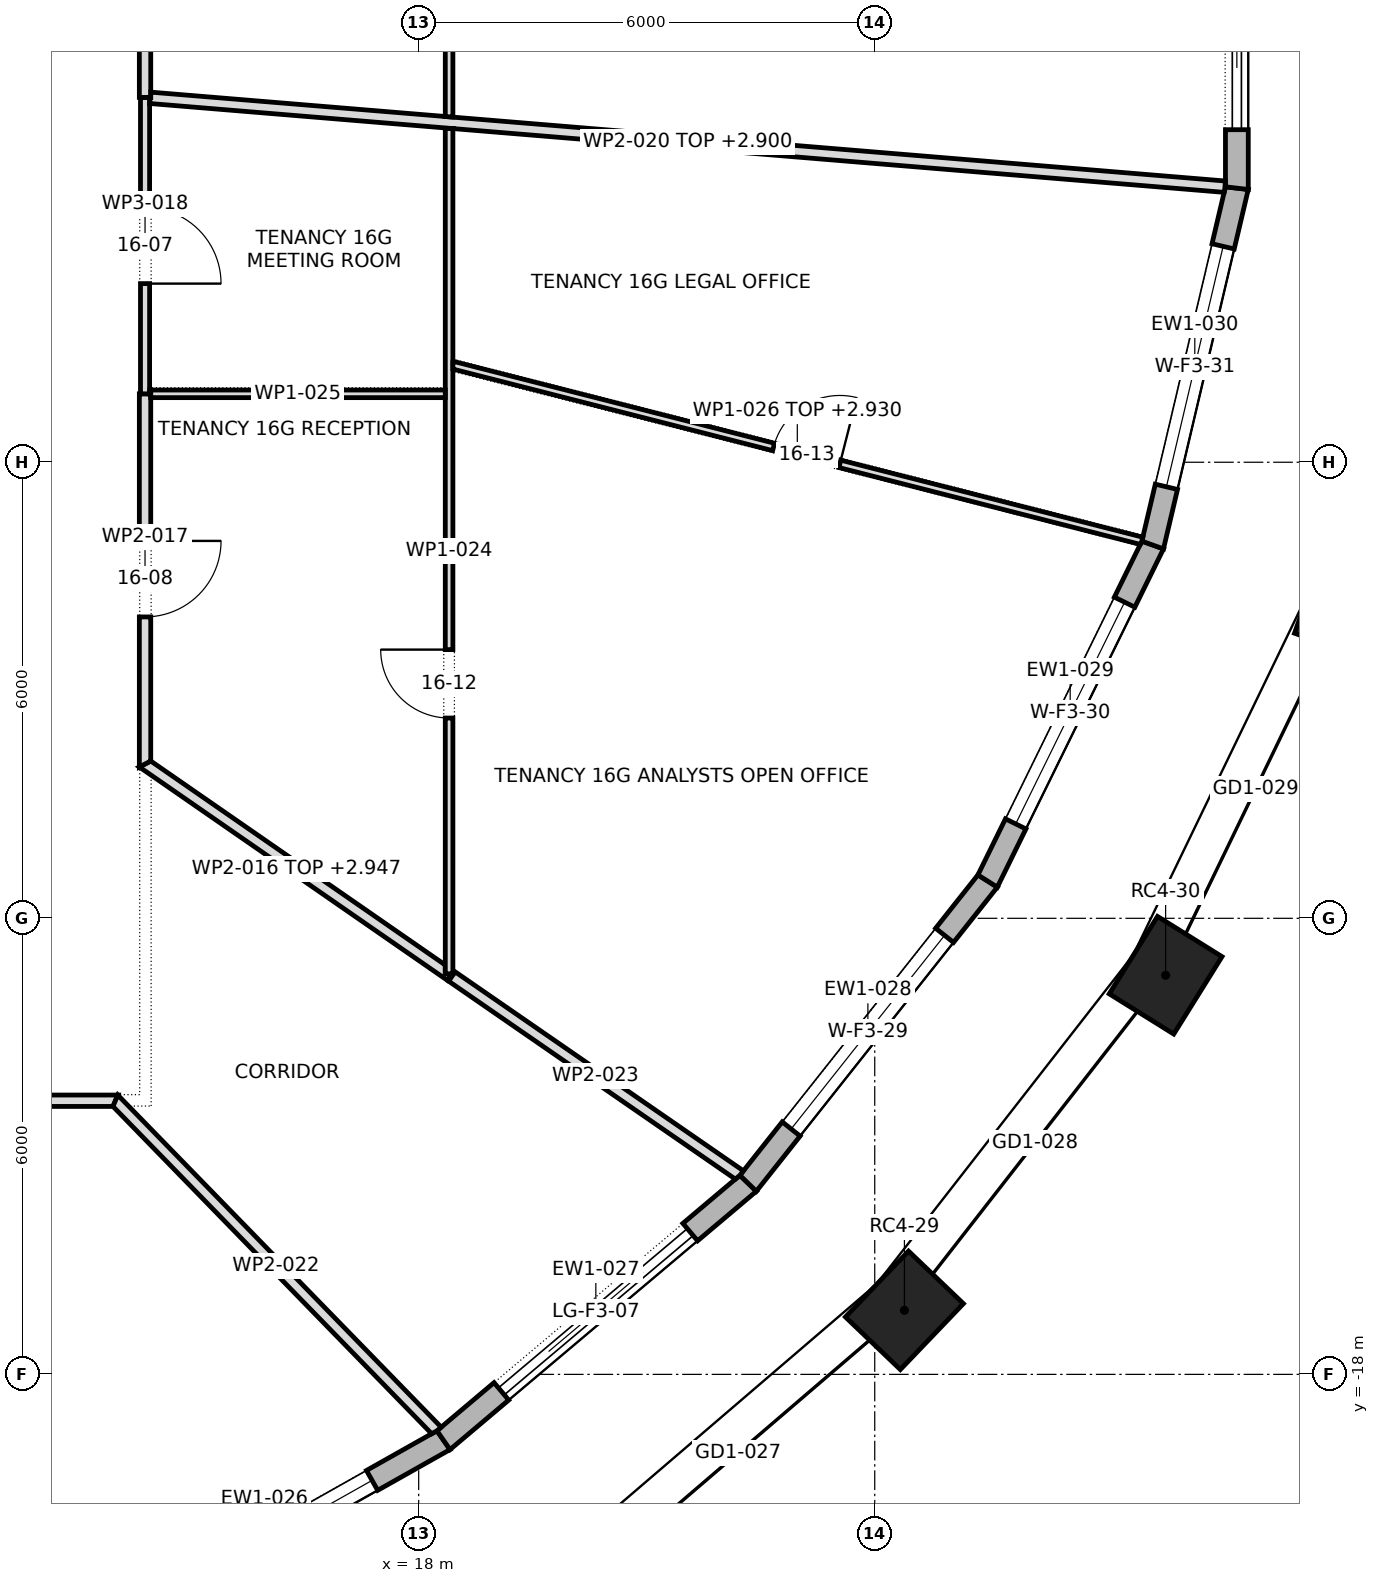
"""IFC4 building model, lengths in metres.
Left out: names, types, materials, properties, quantities, classifications, styles, units other than length and angle.
Written with IfcOpenShell. Run it as: python <this file> out.ifc"""

import sys

from ifc_helpers import new_model, si_unit, direction, frame, frame_2d, origin, origin_2d, place, context, subcontext, project, spatial, polyline, rectangle, outline, extrude, element, fill, save


model = new_model("IFC4")
c1 = context("Model", 3, precision=1e-05, world=origin(), true_north=direction((0.0, 1.0)))
c2 = subcontext(c1, "Body", "Model", "MODEL_VIEW")
j1 = project(units=[si_unit("LENGTHUNIT", "METRE"), si_unit("PLANEANGLEUNIT", "RADIAN")], contexts=[c1])
p1 = place(None, origin())
s1 = spatial("IfcSite", under=j1, at=p1, CompositionType="ELEMENT")
p2 = place(p1, origin())
s2 = spatial("IfcBuilding", under=s1, at=p2, CompositionType="ELEMENT")
p3 = place(p2, frame((0.0, 0.0, 226.9)))
s3 = spatial("IfcBuildingStorey", under=s2, at=p3, CompositionType="ELEMENT", Elevation=226.9)
for number, where, z_axis, x_axis in (
    (1, (24.39, -17.157, 0.0), (0.0, 0.0, 1.0), (0.692, 0.722, 0.0)),
    (2, (27.827, -12.749, 0.0), (0.0, 0.0, 1.0), (0.529, 0.849, 0.0)),
    (3, (30.194, -7.851, 0.0), (0.0, 0.0, 1.0), (0.334, 0.943, 0.0)),
):
    element("IfcColumn", number, at=place(p3, frame(where, z_axis=z_axis, x_axis=x_axis)), inside=s3, PredefinedType="COLUMN", context=c2, shape_type="SweptSolid", body=[
        extrude(rectangle(XDim=1.2, YDim=1.0, at=origin_2d()), origin(), (0.0, 0.0, 1.0), 4.0),
    ])
p4 = place(p3, frame((13.616, -21.52, 0.0), z_axis=(0.0, 0.0, 1.0), x_axis=(0.871225596594, 0.490882837181, 0.0)))
e4 = element("IfcWall", 4, at=p4, inside=s3, PredefinedType="STANDARD", context=c2, shape_type="SweptSolid", body=[
    extrude(outline(polyline([(-0.013, -0.15), (5.421, -0.15), (5.393, 0.15), (0.013, 0.15), (-0.013, -0.15)])), origin(), (0.0, 0.0, 1.0), 3.7),
])
p5 = place(p4, frame((1.078, 0.0, 0.6)))
e5 = element("IfcOpeningElement", 5, at=p5, cuts=e4, PredefinedType="OPENING", context=c2, shape_type="SweptSolid", body=[
    extrude(rectangle(XDim=3.25, YDim=2.65, at=frame_2d((1.625, 1.325))), frame((0.0, 0.162, 0.0), z_axis=(0.0, -1.0, 0.0), x_axis=(1.0, 0.0, 0.0)), (0.0, 0.0, 1.0), 0.324),
])
p6 = place(p3, frame((18.326, -18.865, 0.0), z_axis=(0.0, 0.0, 1.0), x_axis=(0.764475071601, 0.644653290459, 0.0)))
e6 = element("IfcWall", 6, at=p6, inside=s3, PredefinedType="STANDARD", context=c2, shape_type="SweptSolid", body=[
    extrude(outline(polyline([(-0.014, -0.15), (5.258, -0.15), (5.228, 0.15), (0.014, 0.15), (-0.014, -0.15)])), origin(), (0.0, 0.0, 1.0), 3.7),
])
p7 = place(p6, frame((0.996, 0.0, 0.0)))
e7 = element("IfcOpeningElement", 7, at=p7, cuts=e6, PredefinedType="OPENING", context=c2, shape_type="SweptSolid", body=[
    extrude(rectangle(XDim=3.25, YDim=3.25, at=frame_2d((1.625, 1.625))), frame((0.0, 0.162, 0.0), z_axis=(0.0, -1.0, 0.0), x_axis=(1.0, 0.0, 0.0)), (0.0, 0.0, 1.0), 0.324),
])
p8 = place(p3, frame((22.334, -15.486, 0.0), z_axis=(0.0, 0.0, 1.0), x_axis=(0.621084984443, 0.783743224596, 0.0)))
e8 = element("IfcWall", 8, at=p8, inside=s3, PredefinedType="STANDARD", context=c2, shape_type="SweptSolid", body=[
    extrude(outline(polyline([(-0.015, -0.15), (5.089, -0.15), (5.057, 0.15), (0.015, 0.15), (-0.015, -0.15)])), origin(), (0.0, 0.0, 1.0), 3.7),
])
p9 = place(p8, frame((0.912, 0.0, 0.6)))
e9 = element("IfcOpeningElement", 9, at=p9, cuts=e8, PredefinedType="OPENING", context=c2, shape_type="SweptSolid", body=[
    extrude(rectangle(XDim=3.25, YDim=2.65, at=frame_2d((1.625, 1.325))), frame((0.0, 0.162, 0.0), z_axis=(0.0, -1.0, 0.0), x_axis=(1.0, 0.0, 0.0)), (0.0, 0.0, 1.0), 0.324),
])
p10 = place(p3, frame((25.485, -11.51, 0.0), z_axis=(0.0, 0.0, 1.0), x_axis=(0.440857641837, 0.897577038272, 0.0)))
e10 = element("IfcWall", 10, at=p10, inside=s3, PredefinedType="STANDARD", context=c2, shape_type="SweptSolid", body=[
    extrude(outline(polyline([(-0.016, -0.15), (4.942, -0.15), (4.908, 0.15), (0.016, 0.15), (-0.016, -0.15)])), origin(), (0.0, 0.0, 1.0), 3.7),
])
p11 = place(p10, frame((0.838, 0.0, 0.6)))
e11 = element("IfcOpeningElement", 11, at=p11, cuts=e10, PredefinedType="OPENING", context=c2, shape_type="SweptSolid", body=[
    extrude(rectangle(XDim=3.25, YDim=2.65, at=frame_2d((1.625, 1.325))), frame((0.0, 0.162, 0.0), z_axis=(0.0, -1.0, 0.0), x_axis=(1.0, 0.0, 0.0)), (0.0, 0.0, 1.0), 0.324),
])
p12 = place(p3, frame((27.656, -7.089, 0.0), z_axis=(0.0, 0.0, 1.0), x_axis=(0.229617574796, 0.97328093033, 0.0)))
e12 = element("IfcWall", 12, at=p12, inside=s3, PredefinedType="STANDARD", context=c2, shape_type="SweptSolid", body=[
    extrude(outline(polyline([(-0.017, -0.15), (4.841, -0.15), (4.807, 0.15), (0.017, 0.15), (-0.017, -0.15)])), origin(), (0.0, 0.0, 1.0), 3.7),
])
p13 = place(p12, frame((0.787, 0.0, 0.6)))
e13 = element("IfcOpeningElement", 13, at=p13, cuts=e12, PredefinedType="OPENING", context=c2, shape_type="SweptSolid", body=[
    extrude(rectangle(XDim=3.25, YDim=2.65, at=frame_2d((1.625, 1.325))), frame((0.0, 0.162, 0.0), z_axis=(0.0, -1.0, 0.0), x_axis=(1.0, 0.0, 0.0)), (0.0, 0.0, 1.0), 0.324),
])
p14 = place(p3, frame((28.764, -2.394, 0.0), z_axis=(0.0, 0.0, 1.0), x_axis=(0.0, 1.0, 0.0)))
e14 = element("IfcWall", 14, at=p14, inside=s3, PredefinedType="STANDARD", context=c2, shape_type="SweptSolid", body=[
    extrude(outline(polyline([(-0.017, -0.15), (4.805, -0.15), (4.77, 0.15), (0.017, 0.15), (-0.017, -0.15)])), origin(), (0.0, 0.0, 1.0), 3.7),
])
p15 = place(p14, frame((0.769, 0.0, 0.0)))
e15 = element("IfcOpeningElement", 15, at=p15, cuts=e14, PredefinedType="OPENING", context=c2, shape_type="SweptSolid", body=[
    extrude(rectangle(XDim=3.25, YDim=3.25, at=frame_2d((1.625, 1.625))), frame((0.0, 0.162, 0.0), z_axis=(0.0, -1.0, 0.0), x_axis=(1.0, 0.0, 0.0)), (0.0, 0.0, 1.0), 0.324),
])
p16 = place(p3, frame((14.042, -14.4, 0.0), z_axis=(0.0, 0.0, 1.0), x_axis=(-1.0, 0.0, 0.0)))
e16 = element("IfcWall", 16, at=p16, inside=s3, PredefinedType="PARTITIONING", context=c2, shape_type="SweptSolid", body=[
    extrude(outline(polyline([(12.446, -0.075), (12.446, -0.075), (12.278, 0.075), (10.533, 0.075), (8.788, 0.075), (7.043, 0.075), (5.298, 0.075), (3.553, 0.075), (1.808, 0.075), (0.063, 0.075), (0.0, -0.075), (1.778, -0.075), (3.556, -0.075), (5.334, -0.075), (7.112, -0.075), (8.89, -0.075), (10.668, -0.075), (12.446, -0.075)])), origin(), (0.0, 0.0, 1.0), 3.7),
])
p17 = place(p16, frame((5.697, 0.0, 0.0)))
e17 = element("IfcOpeningElement", 17, at=p17, cuts=e16, PredefinedType="OPENING", context=c2, shape_type="SweptSolid", body=[
    extrude(rectangle(XDim=1.0, YDim=2.1, at=frame_2d((0.5, 1.05))), frame((0.0, 0.087, 0.0), z_axis=(0.0, -1.0, 0.0), x_axis=(1.0, 0.0, 0.0)), (0.0, 0.0, 1.0), 0.174),
])
p18 = place(p3, frame((14.368, -9.948, 0.0), z_axis=(0.0, 0.0, 1.0), x_axis=(0.822094305235, -0.569351344339, 0.0)))
e18 = element("IfcWall", 18, at=p18, inside=s3, PredefinedType="PARTITIONING", context=c2, shape_type="SweptSolid", body=[
    extrude(outline(polyline([(4.939, -0.075), (4.939, 0.036), (4.858, -0.02), (4.792, 0.075), (3.221, 0.075), (1.65, 0.075), (0.079, 0.075), (0.039, 0.0), (0.0, -0.075), (1.646, -0.075), (3.293, -0.075), (4.939, -0.075)])), origin(), (0.0, 0.0, 1.0), 2.947),
])
p19 = place(p3, frame((14.4, -5.1, 0.0), z_axis=(0.0, 0.0, 1.0), x_axis=(0.0, -1.0, 0.0)))
e19 = element("IfcWall", 19, at=p19, inside=s3, PredefinedType="PARTITIONING", context=c2, shape_type="SweptSolid", body=[
    extrude(outline(polyline([(4.909, -0.075), (4.909, -0.075), (4.831, 0.075), (3.22, 0.075), (1.61, 0.075), (0.0, 0.075), (0.0, -0.075), (1.636, -0.075), (3.273, -0.075), (4.909, -0.075)])), origin(), (0.0, 0.0, 1.0), 3.7),
])
p20 = place(p19, frame((1.935, 0.0, 0.0)))
e20 = element("IfcOpeningElement", 20, at=p20, cuts=e19, PredefinedType="OPENING", context=c2, shape_type="SweptSolid", body=[
    extrude(rectangle(XDim=1.0, YDim=2.1, at=frame_2d((0.5, 1.05))), frame((0.0, 0.087, 0.0), z_axis=(0.0, -1.0, 0.0), x_axis=(1.0, 0.0, 0.0)), (0.0, 0.0, 1.0), 0.174),
])
p21 = place(p3, frame((14.4, -1.2, 0.0), z_axis=(0.0, 0.0, 1.0), x_axis=(0.0, -1.0, 0.0)))
e21 = element("IfcWall", 21, at=p21, inside=s3, PredefinedType="PARTITIONING", context=c2, shape_type="SweptSolid", body=[
    extrude(rectangle(XDim=3.9, YDim=0.12, at=frame_2d((1.95, 0.0))), origin(), (0.0, 0.0, 1.0), 3.7),
])
p22 = place(p21, frame((1.45, 0.0, 0.0)))
e22 = element("IfcOpeningElement", 22, at=p22, cuts=e21, PredefinedType="OPENING", context=c2, shape_type="SweptSolid", body=[
    extrude(rectangle(XDim=1.0, YDim=2.1, at=frame_2d((0.5, 1.05))), frame((0.0, 0.072, 0.0), z_axis=(0.0, -1.0, 0.0), x_axis=(1.0, 0.0, 0.0)), (0.0, 0.0, 1.0), 0.144),
])
p23 = place(p3, frame((14.4, -1.2, 0.0), z_axis=(0.0, 0.0, 1.0), x_axis=(0.0, 1.0, 0.0)))
e23 = element("IfcWall", 23, at=p23, inside=s3, PredefinedType="PARTITIONING", context=c2, shape_type="SweptSolid", body=[
    extrude(outline(polyline([(0.0, -0.075), (1.855, -0.075), (3.71, -0.075), (5.565, -0.075), (7.42, -0.075), (9.276, -0.075), (11.131, -0.075), (11.209, 0.075), (11.209, 0.075), (9.341, 0.075), (7.473, 0.075), (5.604, 0.075), (3.736, 0.075), (1.868, 0.075), (0.0, 0.075), (0.0, -0.075)])), origin(), (0.0, 0.0, 1.0), 3.7),
])
p24 = place(p23, frame((3.07, 0.0, 0.0)))
e24 = element("IfcOpeningElement", 24, at=p24, cuts=e23, PredefinedType="OPENING", context=c2, shape_type="SweptSolid", body=[
    extrude(rectangle(XDim=1.0, YDim=2.1, at=frame_2d((0.5, 1.05))), frame((0.0, 0.087, 0.0), z_axis=(0.0, -1.0, 0.0), x_axis=(1.0, 0.0, 0.0)), (0.0, 0.0, 1.0), 0.174),
])
p25 = place(p3, frame((14.466, -1.206, 0.0), z_axis=(0.0, 0.0, 1.0), x_axis=(0.996598124583, -0.082414671491, 0.0)))
e25 = element("IfcWall", 25, at=p25, inside=s3, PredefinedType="PARTITIONING", context=c2, shape_type="SweptSolid", body=[
    extrude(outline(polyline([(0.0, -0.075), (1.334, -0.075), (2.667, -0.075), (4.001, -0.075), (4.003, -0.075), (4.003, -0.075), (5.7, -0.075), (7.397, -0.075), (9.094, -0.075), (10.791, -0.075), (12.488, -0.075), (14.185, -0.075), (14.19, -0.044), (14.19, 0.075), (12.475, 0.075), (10.761, 0.075), (9.046, 0.075), (7.332, 0.075), (5.617, 0.075), (3.903, 0.075), (3.891, 0.074), (3.891, 0.075), (1.947, 0.075), (0.002, 0.075), (0.008, 0.006), (0.0, 0.006), (0.0, -0.075)])), origin(), (0.0, 0.0, 1.0), 2.9),
])
p26 = place(p3, frame((18.242, -18.747, 0.0), z_axis=(0.0, 0.0, 1.0), x_axis=(-0.697616683155, 0.716471188105, 0.0)))
e26 = element("IfcWall", 26, at=p26, inside=s3, PredefinedType="PARTITIONING", context=c2, shape_type="SweptSolid", body=[
    extrude(outline(polyline([(0.0, -0.075), (1.525, -0.075), (3.049, -0.075), (4.574, -0.075), (6.099, -0.075), (6.067, 0.0), (6.035, 0.075), (4.533, 0.075), (3.031, 0.075), (1.528, 0.075), (0.025, 0.075), (0.005, -0.002), (0.0, -0.072), (0.0, -0.075)])), origin(), (0.0, 0.0, 1.0), 3.7),
])
p27 = place(p3, frame((18.428, -12.76, 0.0), z_axis=(0.0, 0.0, 1.0), x_axis=(0.822939262801, -0.568129360041, 0.0)))
e27 = element("IfcWall", 27, at=p27, inside=s3, PredefinedType="PARTITIONING", context=c2, shape_type="SweptSolid", body=[
    extrude(outline(polyline([(0.0, -0.075), (1.531, -0.075), (3.063, -0.075), (4.594, -0.075), (4.615, 0.0), (4.619, 0.068), (4.619, 0.075), (3.079, 0.075), (1.54, 0.075), (0.0, 0.075), (0.0, 0.038), (0.001, 0.037), (0.0, 0.036), (0.0, -0.075)])), origin(), (0.0, 0.0, 1.0), 3.7),
])
p28 = place(p3, frame((18.4, -12.73, 0.0), z_axis=(0.0, 0.0, 1.0), x_axis=(0.0, 1.0, 0.0)))
e28 = element("IfcWall", 28, at=p28, inside=s3, PredefinedType="PARTITIONING", context=c2, shape_type="SweptSolid", body=[
    extrude(rectangle(XDim=11.12, YDim=0.1, at=frame_2d((5.56, 0.0))), origin(), (0.0, 0.0, 1.0), 3.7),
])
p29 = place(p28, frame((3.365, 0.0, 0.0)))
e29 = element("IfcOpeningElement", 29, at=p29, cuts=e28, PredefinedType="OPENING", context=c2, shape_type="SweptSolid", body=[
    extrude(rectangle(XDim=0.9, YDim=2.1, at=frame_2d((0.45, 1.05))), frame((0.0, 0.062, 0.0), z_axis=(0.0, -1.0, 0.0), x_axis=(1.0, 0.0, 0.0)), (0.0, 0.0, 1.0), 0.124),
])
p30 = place(p3, frame((18.35, -5.1, 0.0), z_axis=(0.0, 0.0, 1.0), x_axis=(-1.0, 0.0, 0.0)))
e30 = element("IfcWall", 30, at=p30, inside=s3, PredefinedType="PARTITIONING", context=c2, shape_type="SweptSolid", body=[
    extrude(outline(polyline([(3.89, -0.05), (3.89, 0.0), (3.875, 0.0), (3.875, 0.05), (1.938, 0.05), (0.0, 0.05), (0.0, -0.05), (1.945, -0.05), (3.89, -0.05)])), origin(), (0.0, 0.0, 1.0), 3.7),
])
p31 = place(p3, frame((18.438, -4.719, 0.0), z_axis=(0.0, 0.0, 1.0), x_axis=(0.968975503795, -0.247156778269, 0.0)))
e31 = element("IfcWall", 31, at=p31, inside=s3, PredefinedType="PARTITIONING", context=c2, shape_type="SweptSolid", body=[
    extrude(outline(polyline([(0.025, -0.05), (1.892, -0.05), (3.759, -0.05), (5.625, -0.05), (7.492, -0.05), (9.358, -0.05), (9.367, -0.008), (9.367, 0.05), (7.494, 0.05), (5.62, 0.05), (3.747, 0.05), (1.874, 0.05), (0.0, 0.05), (0.0, 0.05), (0.025, -0.05)])), origin(), (0.0, 0.0, 1.0), 2.93),
])
p32 = place(p31, frame((4.367, 0.0, 0.0)))
e32 = element("IfcOpeningElement", 32, at=p32, cuts=e31, PredefinedType="OPENING", context=c2, shape_type="SweptSolid", body=[
    extrude(rectangle(XDim=0.9, YDim=2.1, at=frame_2d((0.45, 1.05))), frame((0.0, 0.062, 0.0), z_axis=(0.0, -1.0, 0.0), x_axis=(1.0, 0.0, 0.0)), (0.0, 0.0, 1.0), 0.124),
])
p33 = place(p3, frame((18.4, -1.459, 0.0), z_axis=(0.0, 0.0, 1.0), x_axis=(0.0, 1.0, 0.0)))
e33 = element("IfcWall", 33, at=p33, inside=s3, PredefinedType="PARTITIONING", context=c2, shape_type="SweptSolid", body=[
    extrude(outline(polyline([(0.0, -0.05), (1.557, -0.05), (3.113, -0.05), (4.67, -0.05), (6.227, -0.05), (6.233, -0.048), (6.234, -0.05), (8.027, -0.05), (9.821, -0.05), (9.826, -0.048), (9.827, -0.05), (11.268, -0.05), (12.709, -0.05), (14.151, -0.05), (14.151, -0.05), (14.145, -0.04), (14.151, -0.036), (14.151, -0.034), (14.138, -0.043), (14.073, 0.05), (12.417, 0.05), (10.761, 0.05), (9.105, 0.05), (7.449, 0.05), (7.449, 0.05), (7.349, 0.05), (7.349, 0.05), (5.514, 0.05), (3.679, 0.05), (1.844, 0.05), (0.008, 0.05), (0.0, -0.048), (0.0, -0.05)])), origin(), (0.0, 0.0, 1.0), 3.7),
])
p34 = place(p33, frame((2.6, 0.0, 0.0)))
e34 = element("IfcOpeningElement", 34, at=p34, cuts=e33, PredefinedType="OPENING", context=c2, shape_type="SweptSolid", body=[
    extrude(rectangle(XDim=0.9, YDim=2.1, at=frame_2d((0.45, 1.05))), frame((0.0, 0.062, 0.0), z_axis=(0.0, -1.0, 0.0), x_axis=(1.0, 0.0, 0.0)), (0.0, 0.0, 1.0), 0.124),
])
p35 = place(p5, origin())
e35 = element("IfcWindow", 35, at=p35, inside=s3, PartitioningType="TRIPLE_PANEL_VERTICAL", PredefinedType="WINDOW", context=c2, shape_type="SweptSolid", body=[
    extrude(rectangle(XDim=3.25, YDim=2.65, at=frame_2d((1.625, 1.325))), frame((0.0, 0.03, 0.0), z_axis=(0.0, -1.0, 0.0), x_axis=(1.0, 0.0, 0.0)), (0.0, 0.0, 1.0), 0.06),
])
fill(e5, e35)
p36 = place(p7, origin())
e36 = element("IfcDoor", 36, at=p36, inside=s3, OperationType="DOUBLE_DOOR_SLIDING", PredefinedType="DOOR", context=c2, shape_type="SweptSolid", body=[
    extrude(rectangle(XDim=3.25, YDim=3.25, at=frame_2d((1.625, 1.625))), frame((0.0, 0.025, 0.0), z_axis=(0.0, -1.0, 0.0), x_axis=(1.0, 0.0, 0.0)), (0.0, 0.0, 1.0), 0.05),
])
fill(e7, e36)
p37 = place(p9, origin())
e37 = element("IfcWindow", 37, at=p37, inside=s3, PartitioningType="TRIPLE_PANEL_VERTICAL", PredefinedType="WINDOW", context=c2, shape_type="SweptSolid", body=[
    extrude(rectangle(XDim=3.25, YDim=2.65, at=frame_2d((1.625, 1.325))), frame((0.0, 0.03, 0.0), z_axis=(0.0, -1.0, 0.0), x_axis=(1.0, 0.0, 0.0)), (0.0, 0.0, 1.0), 0.06),
])
fill(e9, e37)
p38 = place(p11, origin())
e38 = element("IfcWindow", 38, at=p38, inside=s3, PartitioningType="TRIPLE_PANEL_VERTICAL", PredefinedType="WINDOW", context=c2, shape_type="SweptSolid", body=[
    extrude(rectangle(XDim=3.25, YDim=2.65, at=frame_2d((1.625, 1.325))), frame((0.0, 0.03, 0.0), z_axis=(0.0, -1.0, 0.0), x_axis=(1.0, 0.0, 0.0)), (0.0, 0.0, 1.0), 0.06),
])
fill(e11, e38)
p39 = place(p13, origin())
e39 = element("IfcWindow", 39, at=p39, inside=s3, PartitioningType="TRIPLE_PANEL_VERTICAL", PredefinedType="WINDOW", context=c2, shape_type="SweptSolid", body=[
    extrude(rectangle(XDim=3.25, YDim=2.65, at=frame_2d((1.625, 1.325))), frame((0.0, 0.03, 0.0), z_axis=(0.0, -1.0, 0.0), x_axis=(1.0, 0.0, 0.0)), (0.0, 0.0, 1.0), 0.06),
])
fill(e13, e39)
p40 = place(p15, origin())
e40 = element("IfcDoor", 40, at=p40, inside=s3, OperationType="DOUBLE_DOOR_SLIDING", PredefinedType="DOOR", context=c2, shape_type="SweptSolid", body=[
    extrude(rectangle(XDim=3.25, YDim=3.25, at=frame_2d((1.625, 1.625))), frame((0.0, 0.025, 0.0), z_axis=(0.0, -1.0, 0.0), x_axis=(1.0, 0.0, 0.0)), (0.0, 0.0, 1.0), 0.05),
])
fill(e15, e40)
p41 = place(p22, origin())
e41 = element("IfcDoor", 41, at=p41, inside=s3, OperationType="SINGLE_SWING_LEFT", PredefinedType="DOOR", context=c2, shape_type="SweptSolid", body=[
    extrude(rectangle(XDim=1.0, YDim=2.1, at=frame_2d((0.5, 1.05))), frame((0.0, 0.025, 0.0), z_axis=(0.0, -1.0, 0.0), x_axis=(1.0, 0.0, 0.0)), (0.0, 0.0, 1.0), 0.05),
])
fill(e22, e41)
p42 = place(p20, origin())
e42 = element("IfcDoor", 42, at=p42, inside=s3, OperationType="SINGLE_SWING_RIGHT", PredefinedType="DOOR", context=c2, shape_type="SweptSolid", body=[
    extrude(rectangle(XDim=1.0, YDim=2.1, at=frame_2d((0.5, 1.05))), frame((0.0, 0.025, 0.0), z_axis=(0.0, -1.0, 0.0), x_axis=(1.0, 0.0, 0.0)), (0.0, 0.0, 1.0), 0.05),
])
fill(e20, e42)
p43 = place(p29, origin())
e43 = element("IfcDoor", 43, at=p43, inside=s3, OperationType="SINGLE_SWING_LEFT", PredefinedType="DOOR", context=c2, shape_type="SweptSolid", body=[
    extrude(rectangle(XDim=0.9, YDim=2.1, at=frame_2d((0.45, 1.05))), frame((0.0, 0.025, 0.0), z_axis=(0.0, -1.0, 0.0), x_axis=(1.0, 0.0, 0.0)), (0.0, 0.0, 1.0), 0.05),
])
fill(e29, e43)
p44 = place(p32, origin())
e44 = element("IfcDoor", 44, at=p44, inside=s3, OperationType="SINGLE_SWING_LEFT", PredefinedType="DOOR", context=c2, shape_type="SweptSolid", body=[
    extrude(rectangle(XDim=0.9, YDim=2.1, at=frame_2d((0.45, 1.05))), frame((0.0, 0.025, 0.0), z_axis=(0.0, -1.0, 0.0), x_axis=(1.0, 0.0, 0.0)), (0.0, 0.0, 1.0), 0.05),
])
fill(e32, e44)
save(model, sys.argv[1])
